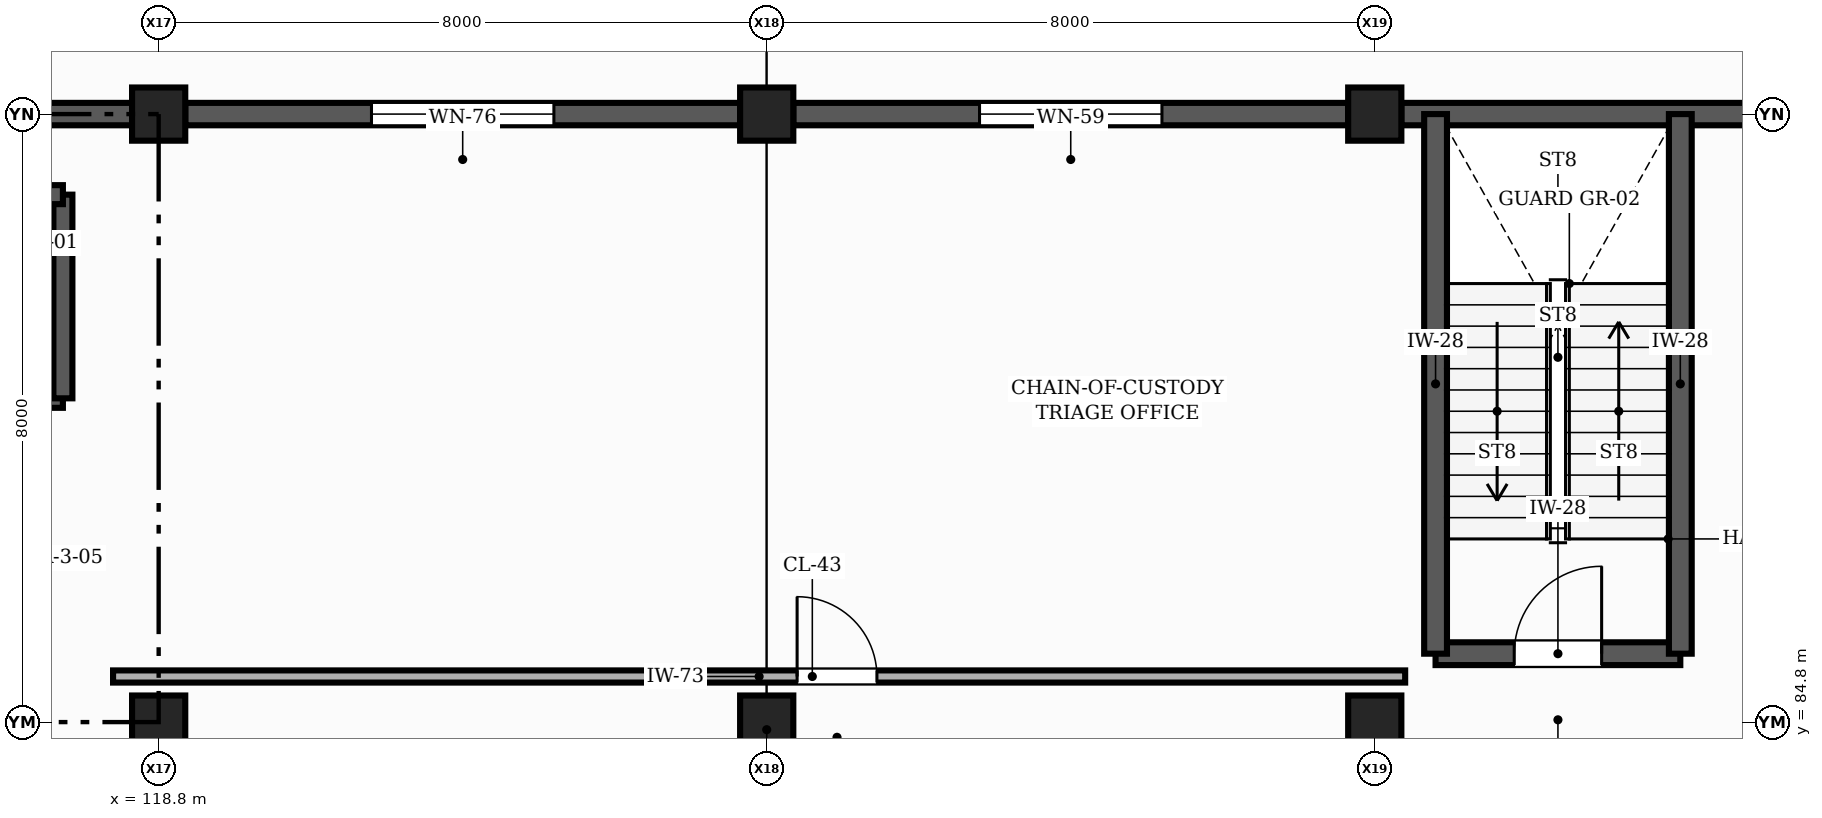
"""IFC4 building model, lengths in metres.
Left out: names, types, materials, properties, quantities, classifications, styles, units other than length and angle.
Written with IfcOpenShell. Run it as: python <this file> out.ifc"""

import sys

from ifc_helpers import new_model, si_unit, direction, frame, frame_2d, origin, origin_2d, place, context, subcontext, project, spatial, rectangle, extrude, element, fill, save


model = new_model("IFC4")
c1 = context("Model", 3, precision=1e-05, world=origin(), true_north=direction((0.0, 1.0)))
c2 = subcontext(c1, "Body", "Model", "MODEL_VIEW")
j1 = project(units=[si_unit("LENGTHUNIT", "METRE"), si_unit("PLANEANGLEUNIT", "RADIAN")], contexts=[c1])
p1 = place(None, origin())
s1 = spatial("IfcSite", under=j1, at=p1, CompositionType="ELEMENT")
p2 = place(p1, origin())
s2 = spatial("IfcBuilding", under=s1, at=p2, CompositionType="ELEMENT")
p3 = place(p2, origin())
s3 = spatial("IfcBuildingStorey", under=s2, at=p3, CompositionType="ELEMENT", Elevation=0.0)
for number, where, z_axis, x_axis in (
    (1, (118.8, 84.8, 0.0), (0.0, 0.0, 1.0), (1.0, 0.0, 0.0)),
    (2, (118.8, 92.8, 0.0), (0.0, 0.0, 1.0), (1.0, 0.0, 0.0)),
    (3, (126.8, 84.8, 0.0), (0.0, 0.0, 1.0), (1.0, 0.0, 0.0)),
    (4, (126.8, 92.8, 0.0), (0.0, 0.0, 1.0), (1.0, 0.0, 0.0)),
    (5, (134.8, 84.8, 0.0), (0.0, 0.0, 1.0), (1.0, 0.0, 0.0)),
    (6, (134.8, 92.8, 0.0), (0.0, 0.0, 1.0), (1.0, 0.0, 0.0)),
):
    element("IfcColumn", number, at=place(p3, frame(where, z_axis=z_axis, x_axis=x_axis)), inside=s3, PredefinedType="COLUMN", context=c2, shape_type="SweptSolid", body=[
        extrude(rectangle(XDim=0.7, YDim=0.7, at=origin_2d()), origin(), (0.0, 0.0, 1.0), 4.8),
    ])
p4 = place(p3, frame((142.45, 92.8, -0.42), z_axis=(0.0, 0.0, 1.0), x_axis=(-1.0, 0.0, 0.0)))
e7 = element("IfcWall", 7, at=p4, inside=s3, PredefinedType="SOLIDWALL", context=c2, shape_type="SweptSolid", body=[
    extrude(rectangle(XDim=7.3, YDim=0.295, at=frame_2d((3.65, 0.0))), origin(), (0.0, 0.0, 1.0), 4.95),
])
p5 = place(p3, frame((134.45, 92.8, -0.42), z_axis=(0.0, 0.0, 1.0), x_axis=(-1.0, 0.0, 0.0)))
e8 = element("IfcWall", 8, at=p5, inside=s3, PredefinedType="SOLIDWALL", context=c2, shape_type="SweptSolid", body=[
    extrude(rectangle(XDim=7.3, YDim=0.295, at=frame_2d((3.65, 0.0))), origin(), (0.0, 0.0, 1.0), 4.2),
])
p6 = place(p5, frame((2.45, 0.0, 1.32)))
e9 = element("IfcOpeningElement", 9, at=p6, cuts=e8, PredefinedType="OPENING", context=c2, shape_type="SweptSolid", body=[
    extrude(rectangle(XDim=2.4, YDim=1.5, at=frame_2d((1.2, 0.75))), frame((0.0, 0.157, 0.0), z_axis=(0.0, -1.0, 0.0), x_axis=(1.0, 0.0, 0.0)), (0.0, 0.0, 1.0), 0.315),
])
p7 = place(p3, frame((126.45, 92.8, -0.42), z_axis=(0.0, 0.0, 1.0), x_axis=(-1.0, 0.0, 0.0)))
e10 = element("IfcWall", 10, at=p7, inside=s3, PredefinedType="SOLIDWALL", context=c2, shape_type="SweptSolid", body=[
    extrude(rectangle(XDim=7.3, YDim=0.295, at=frame_2d((3.65, 0.0))), origin(), (0.0, 0.0, 1.0), 4.2),
])
p8 = place(p7, frame((2.45, 0.0, 1.32)))
e11 = element("IfcOpeningElement", 11, at=p8, cuts=e10, PredefinedType="OPENING", context=c2, shape_type="SweptSolid", body=[
    extrude(rectangle(XDim=2.4, YDim=1.8, at=frame_2d((1.2, 0.9))), frame((0.0, 0.157, 0.0), z_axis=(0.0, -1.0, 0.0), x_axis=(1.0, 0.0, 0.0)), (0.0, 0.0, 1.0), 0.315),
])
p9 = place(p3, frame((118.45, 92.8, -0.42), z_axis=(0.0, 0.0, 1.0), x_axis=(-1.0, 0.0, 0.0)))
e12 = element("IfcWall", 12, at=p9, inside=s3, PredefinedType="SOLIDWALL", context=c2, shape_type="SweptSolid", body=[
    extrude(rectangle(XDim=7.3, YDim=0.295, at=frame_2d((3.65, 0.0))), origin(), (0.0, 0.0, 1.0), 4.95),
])
p10 = place(p3, frame((115.46, 89.06, 0.0), z_axis=(0.0, 0.0, 1.0), x_axis=(1.0, 0.0, 0.0)))
e13 = element("IfcWall", 13, at=p10, inside=s3, PredefinedType="SHEAR", context=c2, shape_type="SweptSolid", body=[
    extrude(rectangle(XDim=2.08, YDim=0.25, at=frame_2d((1.04, 0.0))), origin(), (0.0, 0.0, 1.0), 4.8),
])
p11 = place(p10, frame((0.39, 0.0, 0.0)))
e14 = element("IfcOpeningElement", 14, at=p11, cuts=e13, PredefinedType="OPENING", context=c2, shape_type="SweptSolid", body=[
    extrude(rectangle(XDim=1.3, YDim=2.25, at=frame_2d((0.65, 1.125))), frame((0.0, 0.135, 0.0), z_axis=(0.0, -1.0, 0.0), x_axis=(1.0, 0.0, 0.0)), (0.0, 0.0, 1.0), 0.27),
])
p12 = place(p3, frame((117.54, 89.06, 0.0), z_axis=(0.0, 0.0, 1.0), x_axis=(0.0, 1.0, 0.0)))
e15 = element("IfcWall", 15, at=p12, inside=s3, PredefinedType="SHEAR", context=c2, shape_type="SweptSolid", body=[
    extrude(rectangle(XDim=2.68, YDim=0.25, at=frame_2d((1.34, 0.0))), origin(), (0.0, 0.0, 1.0), 4.8),
])
p13 = place(p3, frame((117.54, 91.74, 0.0), z_axis=(0.0, 0.0, 1.0), x_axis=(-1.0, 0.0, 0.0)))
e16 = element("IfcWall", 16, at=p13, inside=s3, PredefinedType="SHEAR", context=c2, shape_type="SweptSolid", body=[
    extrude(rectangle(XDim=2.08, YDim=0.25, at=frame_2d((1.04, 0.0))), origin(), (0.0, 0.0, 1.0), 4.8),
])
p14 = place(p3, frame((135.6, 85.7, 0.0), z_axis=(0.0, 0.0, 1.0), x_axis=(1.0, 0.0, 0.0)))
e17 = element("IfcWall", 17, at=p14, inside=s3, PredefinedType="SHEAR", context=c2, shape_type="SweptSolid", body=[
    extrude(rectangle(XDim=3.22, YDim=0.3, at=frame_2d((1.61, 0.0))), origin(), (0.0, 0.0, 1.0), 4.8),
])
p15 = place(p14, frame((1.035, 0.0, 0.0)))
e18 = element("IfcOpeningElement", 18, at=p15, cuts=e17, PredefinedType="OPENING", context=c2, shape_type="SweptSolid", body=[
    extrude(rectangle(XDim=1.15, YDim=2.15, at=frame_2d((0.575, 1.075))), frame((0.0, 0.16, 0.0), z_axis=(0.0, -1.0, 0.0), x_axis=(1.0, 0.0, 0.0)), (0.0, 0.0, 1.0), 0.32),
])
for number, where, z_axis, x_axis in (
    (19, (138.82, 85.7, 0.0), (0.0, 0.0, 1.0), (0.0, 1.0, 0.0)),
    (20, (135.6, 92.8, 0.0), (0.0, 0.0, 1.0), (0.0, -1.0, 0.0)),
):
    element("IfcWall", number, at=place(p3, frame(where, z_axis=z_axis, x_axis=x_axis)), inside=s3, PredefinedType="SHEAR", context=c2, shape_type="SweptSolid", body=[
        extrude(rectangle(XDim=7.1, YDim=0.3, at=frame_2d((3.55, 0.0))), origin(), (0.0, 0.0, 1.0), 4.8),
    ])
p16 = place(p3, frame((118.2, 85.4, 0.0), z_axis=(0.0, 0.0, 1.0), x_axis=(1.0, 0.0, 0.0)))
e21 = element("IfcWall", 21, at=p16, inside=s3, PredefinedType="PARTITIONING", context=c2, shape_type="SweptSolid", body=[
    extrude(rectangle(XDim=17.0, YDim=0.16, at=frame_2d((8.5, 0.0))), origin(), (0.0, 0.0, 1.0), 3.815),
])
p17 = place(p16, frame((9.0, 0.0, 0.0)))
e22 = element("IfcOpeningElement", 22, at=p17, cuts=e21, PredefinedType="OPENING", context=c2, shape_type="SweptSolid", body=[
    extrude(rectangle(XDim=1.05, YDim=2.1, at=frame_2d((0.525, 1.05))), frame((0.0, 0.09, 0.0), z_axis=(0.0, -1.0, 0.0), x_axis=(1.0, 0.0, 0.0)), (0.0, 0.0, 1.0), 0.18),
])
p18 = place(p6, origin())
e23 = element("IfcWindow", 23, at=p18, inside=s3, PartitioningType="SINGLE_PANEL", PredefinedType="WINDOW", context=c2, shape_type="SweptSolid", body=[
    extrude(rectangle(XDim=2.4, YDim=1.5, at=frame_2d((1.2, 0.75))), frame((0.0, 0.03, 0.0), z_axis=(0.0, -1.0, 0.0), x_axis=(1.0, 0.0, 0.0)), (0.0, 0.0, 1.0), 0.06),
])
fill(e9, e23)
p19 = place(p8, origin())
e24 = element("IfcWindow", 24, at=p19, inside=s3, PartitioningType="SINGLE_PANEL", PredefinedType="WINDOW", context=c2, shape_type="SweptSolid", body=[
    extrude(rectangle(XDim=2.4, YDim=1.8, at=frame_2d((1.2, 0.9))), frame((0.0, 0.03, 0.0), z_axis=(0.0, -1.0, 0.0), x_axis=(1.0, 0.0, 0.0)), (0.0, 0.0, 1.0), 0.06),
])
fill(e11, e24)
p20 = place(p15, origin())
e25 = element("IfcDoor", 25, at=p20, inside=s3, OperationType="SINGLE_SWING_RIGHT", PredefinedType="DOOR", context=c2, shape_type="SweptSolid", body=[
    extrude(rectangle(XDim=1.15, YDim=2.15, at=frame_2d((0.575, 1.075))), frame((0.0, 0.025, 0.0), z_axis=(0.0, -1.0, 0.0), x_axis=(1.0, 0.0, 0.0)), (0.0, 0.0, 1.0), 0.05),
])
fill(e18, e25)
p21 = place(p17, origin())
e26 = element("IfcDoor", 26, at=p21, inside=s3, OperationType="SINGLE_SWING_LEFT", PredefinedType="DOOR", context=c2, shape_type="SweptSolid", body=[
    extrude(rectangle(XDim=1.05, YDim=2.1, at=frame_2d((0.525, 1.05))), frame((0.0, 0.025, 0.0), z_axis=(0.0, -1.0, 0.0), x_axis=(1.0, 0.0, 0.0)), (0.0, 0.0, 1.0), 0.05),
])
fill(e22, e26)
save(model, sys.argv[1])
